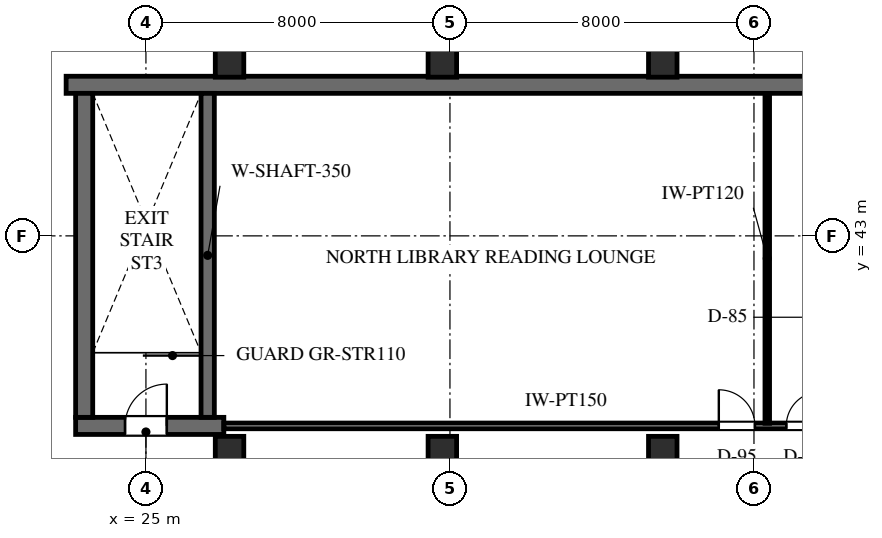
"""IFC4 building model, lengths in metres.
Left out: names, types, materials, properties, quantities, classifications, styles, units other than length and angle.
Written with IfcOpenShell. Run it as: python <this file> out.ifc"""

import sys

from ifc_helpers import new_model, si_unit, direction, frame, frame_2d, origin, origin_2d, place, context, subcontext, project, spatial, rectangle, extrude, element, fill, save


model = new_model("IFC4")
c1 = context("Model", 3, precision=1e-05, world=origin(), true_north=direction((0.0, 1.0)))
c2 = subcontext(c1, "Body", "Model", "MODEL_VIEW")
j1 = project(units=[si_unit("LENGTHUNIT", "METRE"), si_unit("PLANEANGLEUNIT", "RADIAN")], contexts=[c1])
p1 = place(None, origin())
s1 = spatial("IfcSite", under=j1, at=p1, CompositionType="ELEMENT")
p2 = place(p1, origin())
s2 = spatial("IfcBuilding", under=s1, at=p2, CompositionType="ELEMENT")
p3 = place(p2, frame((0.0, 0.0, 241.8)))
s3 = spatial("IfcBuildingStorey", under=s2, at=p3, CompositionType="ELEMENT", Elevation=241.8)
p4 = place(p3, frame((22.9, 46.975, 0.0), z_axis=(0.0, 0.0, 1.0), x_axis=(1.0, 0.0, 0.0)))
e1 = element("IfcWall", 1, at=p4, inside=s3, PredefinedType="SHEAR", context=c2, shape_type="SweptSolid", body=[
    extrude(rectangle(XDim=43.4, YDim=0.45, at=frame_2d((21.7, 0.0))), origin(), (0.0, 0.0, 1.0), 3.6),
])
p5 = place(p3, frame((23.15, 38.0, 0.0), z_axis=(0.0, 0.0, 1.0), x_axis=(1.0, 0.0, 0.0)))
e2 = element("IfcWall", 2, at=p5, inside=s3, PredefinedType="SHEAR", context=c2, shape_type="SweptSolid", body=[
    extrude(rectangle(XDim=3.9, YDim=0.45, at=frame_2d((1.95, 0.0))), origin(), (0.0, 0.0, 1.0), 3.6),
])
p6 = place(p5, frame((1.3, 0.0, 0.0)))
e3 = element("IfcOpeningElement", 3, at=p6, cuts=e2, PredefinedType="OPENING", context=c2, shape_type="SweptSolid", body=[
    extrude(rectangle(XDim=1.1, YDim=2.2, at=frame_2d((0.55, 1.1))), frame((0.0, 0.235, 0.0), z_axis=(0.0, -1.0, 0.0), x_axis=(1.0, 0.0, 0.0)), (0.0, 0.0, 1.0), 0.47),
])
p7 = place(p3, frame((23.375, 38.225, 0.0), z_axis=(0.0, 0.0, 1.0), x_axis=(0.0, 1.0, 0.0)))
e4 = element("IfcWall", 4, at=p7, inside=s3, PredefinedType="SHEAR", context=c2, shape_type="SweptSolid", body=[
    extrude(rectangle(XDim=8.525, YDim=0.45, at=frame_2d((4.262, 0.0))), origin(), (0.0, 0.0, 1.0), 3.6),
])
p8 = place(p3, frame((26.625, 38.225, 0.0), z_axis=(0.0, 0.0, 1.0), x_axis=(0.0, 1.0, 0.0)))
e5 = element("IfcWall", 5, at=p8, inside=s3, PredefinedType="SHEAR", context=c2, shape_type="SweptSolid", body=[
    extrude(rectangle(XDim=8.525, YDim=0.35, at=frame_2d((4.262, 0.0))), origin(), (0.0, 0.0, 1.0), 3.6),
])
for number, where, z_axis, x_axis in (
    (6, (38.6, 37.35, 0.0), (0.0, 0.0, 1.0), (1.0, 0.0, 0.0)),
    (7, (38.6, 47.55, 0.0), (0.0, 0.0, 1.0), (1.0, 0.0, 0.0)),
    (8, (32.8, 37.35, 0.0), (0.0, 0.0, 1.0), (1.0, 0.0, 0.0)),
    (9, (32.8, 47.55, 0.0), (0.0, 0.0, 1.0), (1.0, 0.0, 0.0)),
    (10, (27.2, 37.35, 0.0), (0.0, 0.0, 1.0), (1.0, 0.0, 0.0)),
    (11, (27.2, 47.55, 0.0), (0.0, 0.0, 1.0), (1.0, 0.0, 0.0)),
):
    element("IfcColumn", number, at=place(p3, frame(where, z_axis=z_axis, x_axis=x_axis)), inside=s3, PredefinedType="COLUMN", context=c2, shape_type="SweptSolid", body=[
        extrude(rectangle(XDim=0.75, YDim=0.75, at=origin_2d()), origin(), (0.0, 0.0, 1.0), 3.6),
    ])
p9 = place(p3, frame((27.05, 38.0, 0.0), z_axis=(0.0, 0.0, 1.0), x_axis=(1.0, 0.0, 0.0)))
e12 = element("IfcWall", 12, at=p9, inside=s3, PredefinedType="PARTITIONING", context=c2, shape_type="SweptSolid", body=[
    extrude(rectangle(XDim=18.0, YDim=0.15, at=frame_2d((9.0, 0.0))), origin(), (0.0, 0.0, 1.0), 2.654),
])
p10 = place(p9, frame((13.025, 0.0, 0.0)))
e13 = element("IfcOpeningElement", 13, at=p10, cuts=e12, PredefinedType="OPENING", context=c2, shape_type="SweptSolid", body=[
    extrude(rectangle(XDim=0.95, YDim=2.15, at=frame_2d((0.475, 1.075))), frame((0.0, 0.085, 0.0), z_axis=(0.0, -1.0, 0.0), x_axis=(1.0, 0.0, 0.0)), (0.0, 0.0, 1.0), 0.17),
])
p11 = place(p9, frame((14.8, 0.0, 0.0)))
e14 = element("IfcOpeningElement", 14, at=p11, cuts=e12, PredefinedType="OPENING", context=c2, shape_type="SweptSolid", body=[
    extrude(rectangle(XDim=0.9, YDim=2.1, at=frame_2d((0.45, 1.05))), frame((0.0, 0.085, 0.0), z_axis=(0.0, -1.0, 0.0), x_axis=(1.0, 0.0, 0.0)), (0.0, 0.0, 1.0), 0.17),
])
p12 = place(p3, frame((41.35, 38.068, 0.0), z_axis=(0.0, 0.0, 1.0), x_axis=(0.0, 1.0, 0.0)))
e15 = element("IfcWall", 15, at=p12, inside=s3, PredefinedType="PARTITIONING", context=c2, shape_type="SweptSolid", body=[
    extrude(rectangle(XDim=8.674, YDim=0.12, at=frame_2d((4.337, 0.0))), origin(), (0.0, 0.0, 1.0), 3.35),
])
p13 = place(p6, origin())
e16 = element("IfcDoor", 16, at=p13, inside=s3, OperationType="SINGLE_SWING_RIGHT", PredefinedType="DOOR", context=c2, shape_type="SweptSolid", body=[
    extrude(rectangle(XDim=1.1, YDim=2.2, at=frame_2d((0.55, 1.1))), frame((0.0, 0.025, 0.0), z_axis=(0.0, -1.0, 0.0), x_axis=(1.0, 0.0, 0.0)), (0.0, 0.0, 1.0), 0.05),
])
fill(e3, e16)
p14 = place(p10, origin())
e17 = element("IfcDoor", 17, at=p14, inside=s3, OperationType="SINGLE_SWING_LEFT", PredefinedType="DOOR", context=c2, shape_type="SweptSolid", body=[
    extrude(rectangle(XDim=0.95, YDim=2.15, at=frame_2d((0.475, 1.075))), frame((0.0, 0.025, 0.0), z_axis=(0.0, -1.0, 0.0), x_axis=(1.0, 0.0, 0.0)), (0.0, 0.0, 1.0), 0.05),
])
fill(e13, e17)
p15 = place(p11, origin())
e18 = element("IfcDoor", 18, at=p15, inside=s3, OperationType="SINGLE_SWING_RIGHT", PredefinedType="DOOR", context=c2, shape_type="SweptSolid", body=[
    extrude(rectangle(XDim=0.9, YDim=2.1, at=frame_2d((0.45, 1.05))), frame((0.0, 0.025, 0.0), z_axis=(0.0, -1.0, 0.0), x_axis=(1.0, 0.0, 0.0)), (0.0, 0.0, 1.0), 0.05),
])
fill(e14, e18)
save(model, sys.argv[1])
